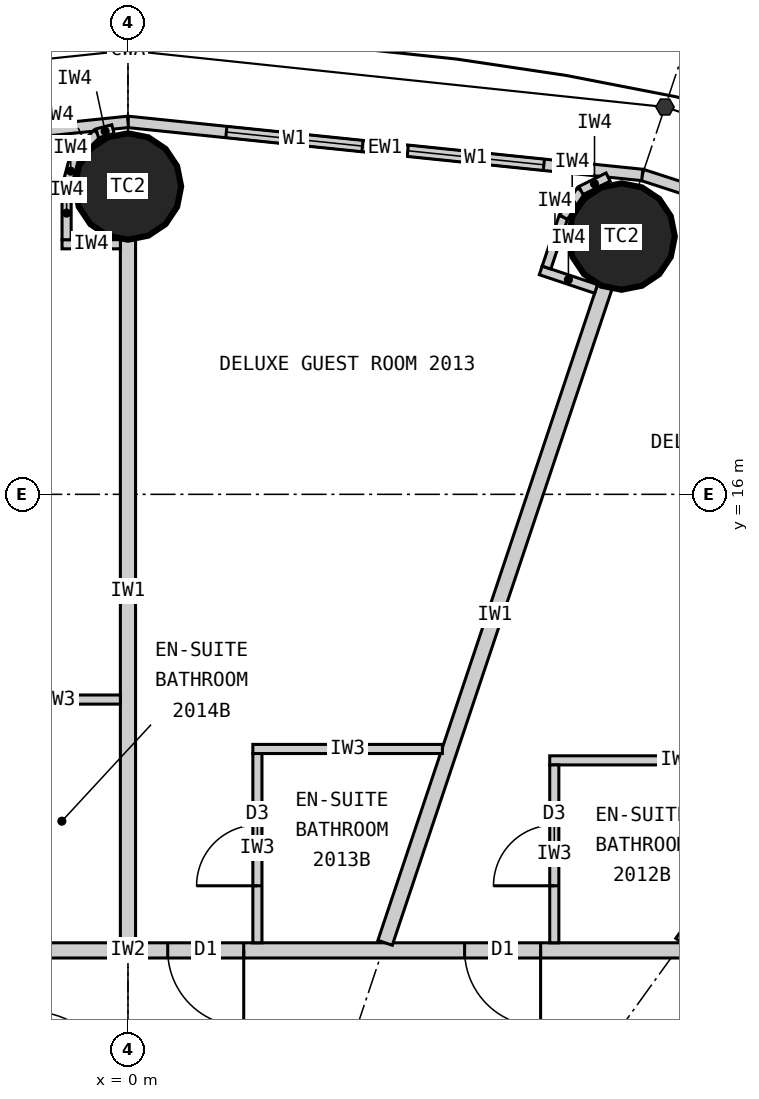
"""IFC4 building model, lengths in metres.
Left out: names, types, materials, properties, quantities, classifications, styles, units other than length and angle.
Written with IfcOpenShell. Run it as: python <this file> out.ifc"""

import sys

from ifc_helpers import new_model, si_unit, direction, frame, frame_2d, origin, origin_2d, place, context, subcontext, project, spatial, rectangle, circle, extrude, element, fill, save


model = new_model("IFC4")
c1 = context("Model", 3, precision=1e-05, world=origin(), true_north=direction((0.0, 1.0)))
c2 = subcontext(c1, "Body", "Model", "MODEL_VIEW")
j1 = project(units=[si_unit("LENGTHUNIT", "METRE"), si_unit("PLANEANGLEUNIT", "RADIAN")], contexts=[c1])
p1 = place(None, origin())
s1 = spatial("IfcSite", under=j1, at=p1, CompositionType="ELEMENT")
p2 = place(p1, origin())
s2 = spatial("IfcBuilding", under=s1, at=p2, CompositionType="ELEMENT")
p3 = place(p2, frame((0.0, 0.0, 80.4)))
s3 = spatial("IfcBuildingStorey", under=s2, at=p3, CompositionType="ELEMENT", Elevation=80.4)
for number, where, z_axis, x_axis in (
    (1, (6.495, 19.391, 0.0), (0.0, 0.0, 1.0), (1.0, 0.0, 0.0)),
    (2, (0.0, 20.05, 0.0), (0.0, 0.0, 1.0), (1.0, 0.0, 0.0)),
):
    element("IfcColumn", number, at=place(p3, frame(where, z_axis=z_axis, x_axis=x_axis)), inside=s3, PredefinedType="COLUMN", context=c2, shape_type="SweptSolid", body=[
        extrude(circle(Radius=0.7, at=origin_2d()), origin(), (0.0, 0.0, 1.0), 3.3),
    ])
p4 = place(p3, frame((13.096, 18.147, 0.0), z_axis=(0.0, 0.0, 1.0), x_axis=(-0.951137534625, 0.308767534285, 0.0)))
e3 = element("IfcWall", 3, at=p4, inside=s3, PredefinedType="ELEMENTEDWALL", context=c2, shape_type="SweptSolid", body=[
    extrude(rectangle(XDim=6.655, YDim=0.15, at=frame_2d((3.328, 0.0))), origin(), (0.0, 0.0, 1.0), 3.12),
])
p5 = place(p4, frame((1.228, 0.0, 0.9)))
e4 = element("IfcOpeningElement", 4, at=p5, cuts=e3, PredefinedType="OPENING", context=c2, shape_type="SweptSolid", body=[
    extrude(rectangle(XDim=1.8, YDim=1.9, at=frame_2d((0.9, 0.95))), frame((0.0, 0.085, 0.0), z_axis=(0.0, -1.0, 0.0), x_axis=(1.0, 0.0, 0.0)), (0.0, 0.0, 1.0), 0.17),
])
p6 = place(p4, frame((3.628, 0.0, 0.9)))
e5 = element("IfcOpeningElement", 5, at=p6, cuts=e3, PredefinedType="OPENING", context=c2, shape_type="SweptSolid", body=[
    extrude(rectangle(XDim=1.8, YDim=1.9, at=frame_2d((0.9, 0.95))), frame((0.0, 0.085, 0.0), z_axis=(0.0, -1.0, 0.0), x_axis=(1.0, 0.0, 0.0)), (0.0, 0.0, 1.0), 0.17),
])
p7 = place(p3, frame((6.766, 20.202, 0.0), z_axis=(0.0, 0.0, 1.0), x_axis=(-0.994721394369, 0.102612609291, 0.0)))
e6 = element("IfcWall", 6, at=p7, inside=s3, PredefinedType="ELEMENTEDWALL", context=c2, shape_type="SweptSolid", body=[
    extrude(rectangle(XDim=6.802, YDim=0.15, at=frame_2d((3.401, 0.0))), origin(), (0.0, 0.0, 1.0), 3.12),
])
p8 = place(p7, frame((1.301, 0.0, 0.9)))
e7 = element("IfcOpeningElement", 7, at=p8, cuts=e6, PredefinedType="OPENING", context=c2, shape_type="SweptSolid", body=[
    extrude(rectangle(XDim=1.8, YDim=1.9, at=frame_2d((0.9, 0.95))), frame((0.0, 0.085, 0.0), z_axis=(0.0, -1.0, 0.0), x_axis=(1.0, 0.0, 0.0)), (0.0, 0.0, 1.0), 0.17),
])
p9 = place(p7, frame((3.701, 0.0, 0.9)))
e8 = element("IfcOpeningElement", 8, at=p9, cuts=e6, PredefinedType="OPENING", context=c2, shape_type="SweptSolid", body=[
    extrude(rectangle(XDim=1.8, YDim=1.9, at=frame_2d((0.9, 0.95))), frame((0.0, 0.085, 0.0), z_axis=(0.0, -1.0, 0.0), x_axis=(1.0, 0.0, 0.0)), (0.0, 0.0, 1.0), 0.17),
])
p10 = place(p3, frame((0.0, 20.9, 0.0), z_axis=(0.0, 0.0, 1.0), x_axis=(-0.994721394369, -0.102612609291, 0.0)))
e9 = element("IfcWall", 9, at=p10, inside=s3, PredefinedType="ELEMENTEDWALL", context=c2, shape_type="SweptSolid", body=[
    extrude(rectangle(XDim=6.802, YDim=0.15, at=frame_2d((3.401, 0.0))), origin(), (0.0, 0.0, 1.0), 3.12),
])
p11 = place(p10, frame((1.301, 0.0, 0.9)))
e10 = element("IfcOpeningElement", 10, at=p11, cuts=e9, PredefinedType="OPENING", context=c2, shape_type="SweptSolid", body=[
    extrude(rectangle(XDim=1.8, YDim=1.9, at=frame_2d((0.9, 0.95))), frame((0.0, 0.085, 0.0), z_axis=(0.0, -1.0, 0.0), x_axis=(1.0, 0.0, 0.0)), (0.0, 0.0, 1.0), 0.17),
])
p12 = place(p10, frame((3.701, 0.0, 0.9)))
e11 = element("IfcOpeningElement", 11, at=p12, cuts=e9, PredefinedType="OPENING", context=c2, shape_type="SweptSolid", body=[
    extrude(rectangle(XDim=1.8, YDim=1.9, at=frame_2d((0.9, 0.95))), frame((0.0, 0.085, 0.0), z_axis=(0.0, -1.0, 0.0), x_axis=(1.0, 0.0, 0.0)), (0.0, 0.0, 1.0), 0.17),
])
p13 = place(p3, frame((-14.1, 10.0, 0.0), z_axis=(0.0, 0.0, 1.0), x_axis=(1.0, 0.0, 0.0)))
e12 = element("IfcWall", 12, at=p13, inside=s3, PredefinedType="PARTITIONING", context=c2, shape_type="SweptSolid", body=[
    extrude(rectangle(XDim=28.2, YDim=0.2, at=frame_2d((14.1, 0.0))), origin(), (0.0, 0.0, 1.0), 3.12),
])
p14 = place(p13, frame((23.865, 0.0, 0.0)))
e13 = element("IfcOpeningElement", 13, at=p14, cuts=e12, PredefinedType="OPENING", context=c2, shape_type="SweptSolid", body=[
    extrude(rectangle(XDim=1.0, YDim=2.2, at=frame_2d((0.5, 1.1))), frame((0.0, 0.11, 0.0), z_axis=(0.0, -1.0, 0.0), x_axis=(1.0, 0.0, 0.0)), (0.0, 0.0, 1.0), 0.22),
])
p15 = place(p13, frame((18.529, 0.0, 0.0)))
e14 = element("IfcOpeningElement", 14, at=p15, cuts=e12, PredefinedType="OPENING", context=c2, shape_type="SweptSolid", body=[
    extrude(rectangle(XDim=1.0, YDim=2.2, at=frame_2d((0.5, 1.1))), frame((0.0, 0.11, 0.0), z_axis=(0.0, -1.0, 0.0), x_axis=(1.0, 0.0, 0.0)), (0.0, 0.0, 1.0), 0.22),
])
p16 = place(p13, frame((14.623, 0.0, 0.0)))
e15 = element("IfcOpeningElement", 15, at=p16, cuts=e12, PredefinedType="OPENING", context=c2, shape_type="SweptSolid", body=[
    extrude(rectangle(XDim=1.0, YDim=2.2, at=frame_2d((0.5, 1.1))), frame((0.0, 0.11, 0.0), z_axis=(0.0, -1.0, 0.0), x_axis=(1.0, 0.0, 0.0)), (0.0, 0.0, 1.0), 0.22),
])
p17 = place(p13, frame((11.24, 0.0, 0.0)))
e16 = element("IfcOpeningElement", 16, at=p17, cuts=e12, PredefinedType="OPENING", context=c2, shape_type="SweptSolid", body=[
    extrude(rectangle(XDim=1.0, YDim=2.2, at=frame_2d((0.5, 1.1))), frame((0.0, 0.11, 0.0), z_axis=(0.0, -1.0, 0.0), x_axis=(1.0, 0.0, 0.0)), (0.0, 0.0, 1.0), 0.22),
])
p18 = place(p13, frame((8.671, 0.0, 0.0)))
e17 = element("IfcOpeningElement", 17, at=p18, cuts=e12, PredefinedType="OPENING", context=c2, shape_type="SweptSolid", body=[
    extrude(rectangle(XDim=1.0, YDim=2.2, at=frame_2d((0.5, 1.1))), frame((0.0, 0.11, 0.0), z_axis=(0.0, -1.0, 0.0), x_axis=(1.0, 0.0, 0.0)), (0.0, 0.0, 1.0), 0.22),
])
p19 = place(p13, frame((2.801, 0.0, 0.0)))
e18 = element("IfcOpeningElement", 18, at=p19, cuts=e12, PredefinedType="OPENING", context=c2, shape_type="SweptSolid", body=[
    extrude(rectangle(XDim=1.0, YDim=2.2, at=frame_2d((0.5, 1.1))), frame((0.0, 0.11, 0.0), z_axis=(0.0, -1.0, 0.0), x_axis=(1.0, 0.0, 0.0)), (0.0, 0.0, 1.0), 0.22),
])
p20 = place(p3, frame((7.289, 10.1, 0.0), z_axis=(0.0, 0.0, 1.0), x_axis=(0.585198353053, 0.810890182197, 0.0)))
e19 = element("IfcWall", 19, at=p20, inside=s3, PredefinedType="PARTITIONING", context=c2, shape_type="SweptSolid", body=[
    extrude(rectangle(XDim=8.36, YDim=0.2, at=frame_2d((4.18, 0.0))), origin(), (0.0, 0.0, 1.0), 2.32),
])
p21 = place(p3, frame((3.383, 10.1, 0.0), z_axis=(0.0, 0.0, 1.0), x_axis=(0.31759592231, 0.948226149256, 0.0)))
e20 = element("IfcWall", 20, at=p21, inside=s3, PredefinedType="PARTITIONING", context=c2, shape_type="SweptSolid", body=[
    extrude(rectangle(XDim=9.098, YDim=0.2, at=frame_2d((4.549, 0.0))), origin(), (0.0, 0.0, 1.0), 2.32),
])
p22 = place(p3, frame((0.0, 10.1, 0.0), z_axis=(0.0, 0.0, 1.0), x_axis=(0.0, 1.0, 0.0)))
e21 = element("IfcWall", 21, at=p22, inside=s3, PredefinedType="PARTITIONING", context=c2, shape_type="SweptSolid", body=[
    extrude(rectangle(XDim=9.25, YDim=0.2, at=frame_2d((4.625, 0.0))), origin(), (0.0, 0.0, 1.0), 2.32),
])
p23 = place(p3, frame((8.921, 12.5, 0.0), z_axis=(0.0, 0.0, 1.0), x_axis=(-1.0, 0.0, 0.0)))
e22 = element("IfcWall", 22, at=p23, inside=s3, PredefinedType="PARTITIONING", context=c2, shape_type="SweptSolid", body=[
    extrude(rectangle(XDim=3.372, YDim=0.12, at=frame_2d((1.686, 0.0))), origin(), (0.0, 0.0, 1.0), 3.12),
])
p24 = place(p3, frame((5.609, 10.1, 0.0), z_axis=(0.0, 0.0, 1.0), x_axis=(0.0, 1.0, 0.0)))
e23 = element("IfcWall", 23, at=p24, inside=s3, PredefinedType="PARTITIONING", context=c2, shape_type="SweptSolid", body=[
    extrude(rectangle(XDim=2.34, YDim=0.12, at=frame_2d((1.17, 0.0))), origin(), (0.0, 0.0, 1.0), 3.12),
])
p25 = place(p24, frame((0.75, 0.0, 0.0)))
e24 = element("IfcOpeningElement", 24, at=p25, cuts=e23, PredefinedType="OPENING", context=c2, shape_type="SweptSolid", body=[
    extrude(rectangle(XDim=0.8, YDim=2.1, at=frame_2d((0.4, 1.05))), frame((0.0, 0.07, 0.0), z_axis=(0.0, -1.0, 0.0), x_axis=(1.0, 0.0, 0.0)), (0.0, 0.0, 1.0), 0.14),
])
p26 = place(p3, frame((4.137, 12.65, 0.0), z_axis=(0.0, 0.0, 1.0), x_axis=(-1.0, 0.0, 0.0)))
e25 = element("IfcWall", 25, at=p26, inside=s3, PredefinedType="PARTITIONING", context=c2, shape_type="SweptSolid", body=[
    extrude(rectangle(XDim=2.494, YDim=0.12, at=frame_2d((1.247, 0.0))), origin(), (0.0, 0.0, 1.0), 3.12),
])
p27 = place(p3, frame((1.703, 10.1, 0.0), z_axis=(0.0, 0.0, 1.0), x_axis=(0.0, 1.0, 0.0)))
e26 = element("IfcWall", 26, at=p27, inside=s3, PredefinedType="PARTITIONING", context=c2, shape_type="SweptSolid", body=[
    extrude(rectangle(XDim=2.49, YDim=0.12, at=frame_2d((1.245, 0.0))), origin(), (0.0, 0.0, 1.0), 3.12),
])
p28 = place(p27, frame((0.75, 0.0, 0.0)))
e27 = element("IfcOpeningElement", 27, at=p28, cuts=e26, PredefinedType="OPENING", context=c2, shape_type="SweptSolid", body=[
    extrude(rectangle(XDim=0.8, YDim=2.1, at=frame_2d((0.4, 1.05))), frame((0.0, 0.07, 0.0), z_axis=(0.0, -1.0, 0.0), x_axis=(1.0, 0.0, 0.0)), (0.0, 0.0, 1.0), 0.14),
])
p29 = place(p3, frame((-0.1, 13.3, 0.0), z_axis=(0.0, 0.0, 1.0), x_axis=(-1.0, 0.0, 0.0)))
e28 = element("IfcWall", 28, at=p29, inside=s3, PredefinedType="PARTITIONING", context=c2, shape_type="SweptSolid", body=[
    extrude(rectangle(XDim=1.64, YDim=0.12, at=frame_2d((0.82, 0.0))), origin(), (0.0, 0.0, 1.0), 3.12),
])
p30 = place(p3, frame((6.159, 18.702, 0.0), z_axis=(0.0, 0.0, 1.0), x_axis=(-0.948173154049, 0.31775410295, 0.0)))
e29 = element("IfcWall", 29, at=p30, inside=s3, PredefinedType="PARTITIONING", context=c2, shape_type="SweptSolid", body=[
    extrude(rectangle(XDim=0.768, YDim=0.12, at=frame_2d((0.384, 0.0))), origin(), (0.0, 0.0, 1.0), 3.12),
])
p31 = place(p3, frame((5.507, 18.984, 0.0), z_axis=(0.0, 0.0, 1.0), x_axis=(0.317692050622, 0.948193946918, 0.0)))
e30 = element("IfcWall", 30, at=p31, inside=s3, PredefinedType="PARTITIONING", context=c2, shape_type="SweptSolid", body=[
    extrude(rectangle(XDim=0.7, YDim=0.12, at=frame_2d((0.35, 0.0))), origin(), (0.0, 0.0, 1.0), 3.12),
])
p32 = place(p3, frame((5.729, 19.648, 0.0), z_axis=(0.0, 0.0, 1.0), x_axis=(0.552135764955, 0.833754218615, 0.0)))
e31 = element("IfcWall", 31, at=p32, inside=s3, PredefinedType="PARTITIONING", context=c2, shape_type="SweptSolid", body=[
    extrude(rectangle(XDim=0.418, YDim=0.12, at=frame_2d((0.209, 0.0))), origin(), (0.0, 0.0, 1.0), 3.12),
])
p33 = place(p3, frame((5.96, 19.996, 0.0), z_axis=(0.0, 0.0, 1.0), x_axis=(0.895160725913, 0.445743507842, 0.0)))
e32 = element("IfcWall", 32, at=p33, inside=s3, PredefinedType="PARTITIONING", context=c2, shape_type="SweptSolid", body=[
    extrude(rectangle(XDim=0.399, YDim=0.12, at=frame_2d((0.199, 0.0))), origin(), (0.0, 0.0, 1.0), 3.12),
])
p34 = place(p3, frame((-0.1, 19.29, 0.0), z_axis=(0.0, 0.0, 1.0), x_axis=(-1.0, 0.0, 0.0)))
e33 = element("IfcWall", 33, at=p34, inside=s3, PredefinedType="PARTITIONING", context=c2, shape_type="SweptSolid", body=[
    extrude(rectangle(XDim=0.767, YDim=0.12, at=frame_2d((0.384, 0.0))), origin(), (0.0, 0.0, 1.0), 3.12),
])
p35 = place(p3, frame((-0.808, 19.35, 0.0), z_axis=(0.0, 0.0, 1.0), x_axis=(0.0, 1.0, 0.0)))
e34 = element("IfcWall", 34, at=p35, inside=s3, PredefinedType="PARTITIONING", context=c2, shape_type="SweptSolid", body=[
    extrude(rectangle(XDim=0.7, YDim=0.12, at=frame_2d((0.35, 0.0))), origin(), (0.0, 0.0, 1.0), 3.12),
])
p36 = place(p3, frame((-0.808, 20.05, 0.0), z_axis=(0.0, 0.0, 1.0), x_axis=(0.2592614205, 0.965807183573, 0.0)))
e35 = element("IfcWall", 35, at=p36, inside=s3, PredefinedType="PARTITIONING", context=c2, shape_type="SweptSolid", body=[
    extrude(rectangle(XDim=0.418, YDim=0.12, at=frame_2d((0.209, 0.0))), origin(), (0.0, 0.0, 1.0), 3.12),
])
p37 = place(p3, frame((-0.699, 20.454, 0.0), z_axis=(0.0, 0.0, 1.0), x_axis=(0.707106781187, 0.707106781187, 0.0)))
e36 = element("IfcWall", 36, at=p37, inside=s3, PredefinedType="PARTITIONING", context=c2, shape_type="SweptSolid", body=[
    extrude(rectangle(XDim=0.418, YDim=0.12, at=frame_2d((0.209, 0.0))), origin(), (0.0, 0.0, 1.0), 3.12),
])
p38 = place(p3, frame((-0.404, 20.749, 0.0), z_axis=(0.0, 0.0, 1.0), x_axis=(0.965759066438, 0.25944060128, 0.0)))
e37 = element("IfcWall", 37, at=p38, inside=s3, PredefinedType="PARTITIONING", context=c2, shape_type="SweptSolid", body=[
    extrude(rectangle(XDim=0.214, YDim=0.12, at=frame_2d((0.107, 0.0))), origin(), (0.0, 0.0, 1.0), 3.12),
])
p39 = place(p8, origin())
e38 = element("IfcWindow", 38, at=p39, inside=s3, PartitioningType="SINGLE_PANEL", PredefinedType="WINDOW", context=c2, shape_type="SweptSolid", body=[
    extrude(rectangle(XDim=1.8, YDim=1.9, at=frame_2d((0.9, 0.95))), frame((0.0, 0.03, 0.0), z_axis=(0.0, -1.0, 0.0), x_axis=(1.0, 0.0, 0.0)), (0.0, 0.0, 1.0), 0.06),
])
fill(e7, e38)
p40 = place(p9, origin())
e39 = element("IfcWindow", 39, at=p40, inside=s3, PartitioningType="SINGLE_PANEL", PredefinedType="WINDOW", context=c2, shape_type="SweptSolid", body=[
    extrude(rectangle(XDim=1.8, YDim=1.9, at=frame_2d((0.9, 0.95))), frame((0.0, 0.03, 0.0), z_axis=(0.0, -1.0, 0.0), x_axis=(1.0, 0.0, 0.0)), (0.0, 0.0, 1.0), 0.06),
])
fill(e8, e39)
p41 = place(p25, origin())
e40 = element("IfcDoor", 40, at=p41, inside=s3, OperationType="SINGLE_SWING_LEFT", PredefinedType="DOOR", context=c2, shape_type="SweptSolid", body=[
    extrude(rectangle(XDim=0.8, YDim=2.1, at=frame_2d((0.4, 1.05))), frame((0.0, 0.025, 0.0), z_axis=(0.0, -1.0, 0.0), x_axis=(1.0, 0.0, 0.0)), (0.0, 0.0, 1.0), 0.05),
])
fill(e24, e40)
p42 = place(p15, origin())
e41 = element("IfcDoor", 41, at=p42, inside=s3, OperationType="SINGLE_SWING_RIGHT", PredefinedType="DOOR", context=c2, shape_type="SweptSolid", body=[
    extrude(rectangle(XDim=1.0, YDim=2.2, at=frame_2d((0.5, 1.1))), frame((0.0, 0.025, 0.0), z_axis=(0.0, -1.0, 0.0), x_axis=(1.0, 0.0, 0.0)), (0.0, 0.0, 1.0), 0.05),
])
fill(e14, e41)
p43 = place(p28, origin())
e42 = element("IfcDoor", 42, at=p43, inside=s3, OperationType="SINGLE_SWING_LEFT", PredefinedType="DOOR", context=c2, shape_type="SweptSolid", body=[
    extrude(rectangle(XDim=0.8, YDim=2.1, at=frame_2d((0.4, 1.05))), frame((0.0, 0.025, 0.0), z_axis=(0.0, -1.0, 0.0), x_axis=(1.0, 0.0, 0.0)), (0.0, 0.0, 1.0), 0.05),
])
fill(e27, e42)
p44 = place(p16, origin())
e43 = element("IfcDoor", 43, at=p44, inside=s3, OperationType="SINGLE_SWING_RIGHT", PredefinedType="DOOR", context=c2, shape_type="SweptSolid", body=[
    extrude(rectangle(XDim=1.0, YDim=2.2, at=frame_2d((0.5, 1.1))), frame((0.0, 0.025, 0.0), z_axis=(0.0, -1.0, 0.0), x_axis=(1.0, 0.0, 0.0)), (0.0, 0.0, 1.0), 0.05),
])
fill(e15, e43)
save(model, sys.argv[1])
